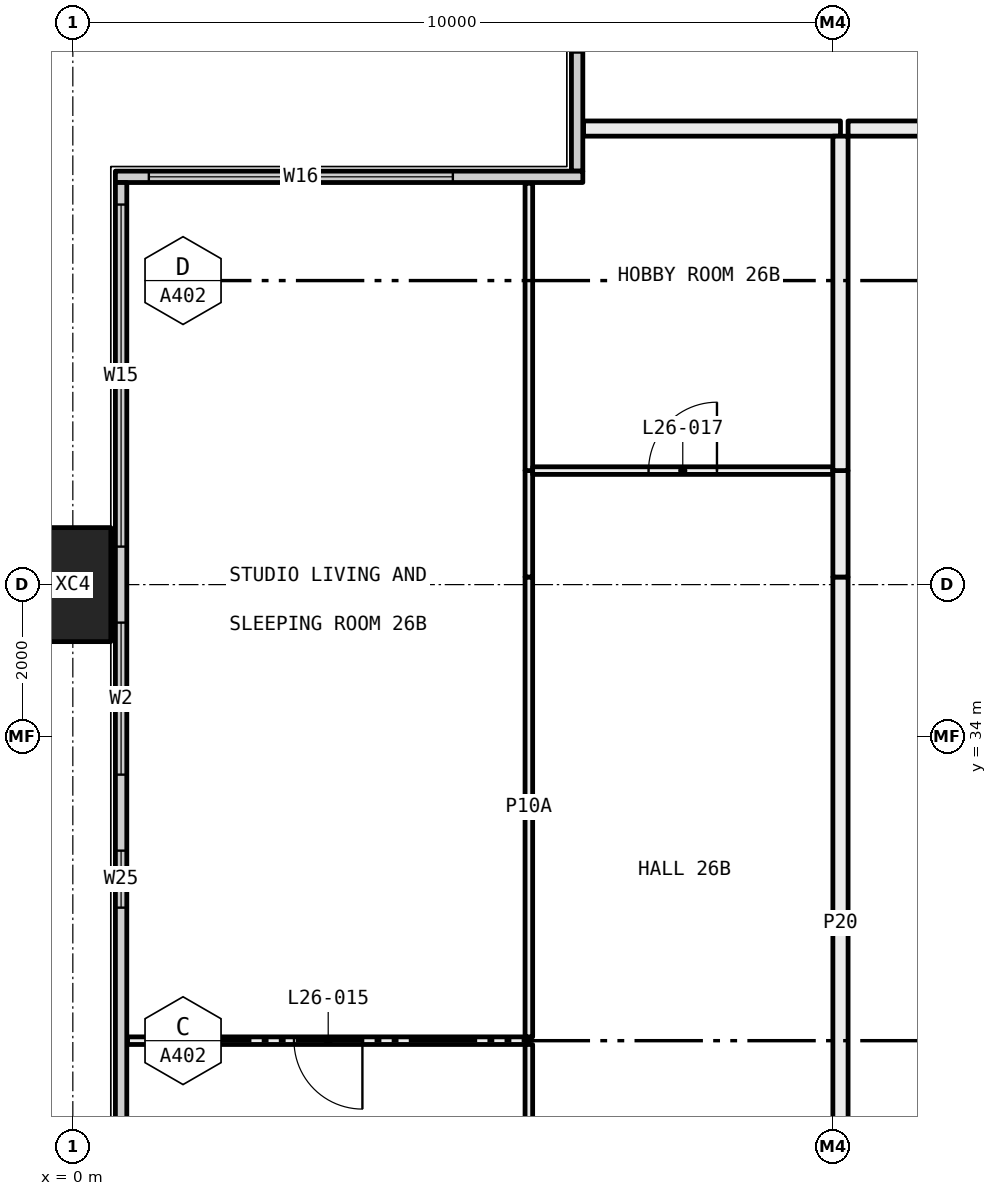
"""IFC4 building model, lengths in metres.
Left out: names, types, materials, properties, quantities, classifications, styles, units other than length and angle.
Written with IfcOpenShell. Run it as: python <this file> out.ifc"""

import sys

from ifc_helpers import new_model, si_unit, direction, frame, frame_2d, origin, origin_2d, place, context, subcontext, project, spatial, rectangle, hollow_rectangle, extrude, element, fill, save


model = new_model("IFC4")
c1 = context("Model", 3, precision=1e-05, world=origin(), true_north=direction((0.0, 1.0)))
c2 = subcontext(c1, "Body", "Model", "MODEL_VIEW")
j1 = project(units=[si_unit("LENGTHUNIT", "METRE"), si_unit("PLANEANGLEUNIT", "RADIAN")], contexts=[c1])
p1 = place(None, origin())
s1 = spatial("IfcSite", under=j1, at=p1, CompositionType="ELEMENT")
p2 = place(p1, origin())
s2 = spatial("IfcBuilding", under=s1, at=p2, CompositionType="ELEMENT")
p3 = place(p2, frame((0.0, 0.0, 103.5)))
s3 = spatial("IfcBuildingStorey", under=s2, at=p3, CompositionType="ELEMENT", Elevation=103.5)
p4 = place(p3, frame((0.0, 36.0, -0.4), z_axis=(0.0, 0.0, 1.0), x_axis=(0.0, 1.0, 0.0)))
e1 = element("IfcColumn", 1, at=p4, inside=s3, PredefinedType="COLUMN", context=c2, shape_type="SweptSolid", body=[
    extrude(hollow_rectangle(XDim=1.5, YDim=1.0, WallThickness=0.06, at=origin_2d()), origin(), (0.0, 0.0, 1.0), 3.45),
])
p5 = place(p3, frame((6.635, 41.44, 0.0), z_axis=(0.0, 0.0, 1.0), x_axis=(0.0, 1.0, 0.0)))
e2 = element("IfcWall", 2, at=p5, inside=s3, PredefinedType="ELEMENTEDWALL", context=c2, shape_type="SweptSolid", body=[
    extrude(rectangle(XDim=5.85, YDim=0.15, at=frame_2d((2.925, 0.0))), origin(), (0.0, 0.0, 1.0), 3.05),
])
p6 = place(p5, frame((1.56, 0.0, 0.45)))
e3 = element("IfcOpeningElement", 3, at=p6, cuts=e2, PredefinedType="OPENING", context=c2, shape_type="SweptSolid", body=[
    extrude(rectangle(XDim=4.0, YDim=2.55, at=frame_2d((2.0, 1.275))), frame((0.0, 0.085, 0.0), z_axis=(0.0, -1.0, 0.0), x_axis=(1.0, 0.0, 0.0)), (0.0, 0.0, 1.0), 0.17),
])
p7 = place(p3, frame((0.56, 41.365, 0.0), z_axis=(0.0, 0.0, 1.0), x_axis=(1.0, 0.0, 0.0)))
e4 = element("IfcWall", 4, at=p7, inside=s3, PredefinedType="ELEMENTEDWALL", context=c2, shape_type="SweptSolid", body=[
    extrude(rectangle(XDim=6.15, YDim=0.15, at=frame_2d((3.075, 0.0))), origin(), (0.0, 0.0, 1.0), 3.05),
])
p8 = place(p7, frame((0.44, 0.0, 0.45)))
e5 = element("IfcOpeningElement", 5, at=p8, cuts=e4, PredefinedType="OPENING", context=c2, shape_type="SweptSolid", body=[
    extrude(rectangle(XDim=4.0, YDim=2.55, at=frame_2d((2.0, 1.275))), frame((0.0, 0.085, 0.0), z_axis=(0.0, -1.0, 0.0), x_axis=(1.0, 0.0, 0.0)), (0.0, 0.0, 1.0), 0.17),
])
p9 = place(p3, frame((0.635, 18.71, 0.0), z_axis=(0.0, 0.0, 1.0), x_axis=(0.0, 1.0, 0.0)))
e6 = element("IfcWall", 6, at=p9, inside=s3, PredefinedType="ELEMENTEDWALL", context=c2, shape_type="SweptSolid", body=[
    extrude(rectangle(XDim=22.58, YDim=0.15, at=frame_2d((11.29, 0.0))), origin(), (0.0, 0.0, 1.0), 3.05),
])
p10 = place(p9, frame((0.29, 0.0, 0.45)))
e7 = element("IfcOpeningElement", 7, at=p10, cuts=e6, PredefinedType="OPENING", context=c2, shape_type="SweptSolid", body=[
    extrude(rectangle(XDim=4.5, YDim=2.55, at=frame_2d((2.25, 1.275))), frame((0.0, 0.085, 0.0), z_axis=(0.0, -1.0, 0.0), x_axis=(1.0, 0.0, 0.0)), (0.0, 0.0, 1.0), 0.17),
])
p11 = place(p9, frame((5.79, 0.0, 0.45)))
e8 = element("IfcOpeningElement", 8, at=p11, cuts=e6, PredefinedType="OPENING", context=c2, shape_type="SweptSolid", body=[
    extrude(rectangle(XDim=3.75, YDim=2.55, at=frame_2d((1.875, 1.275))), frame((0.0, 0.085, 0.0), z_axis=(0.0, -1.0, 0.0), x_axis=(1.0, 0.0, 0.0)), (0.0, 0.0, 1.0), 0.17),
])
p12 = place(p9, frame((13.04, 0.0, 0.45)))
e9 = element("IfcOpeningElement", 9, at=p12, cuts=e6, PredefinedType="OPENING", context=c2, shape_type="SweptSolid", body=[
    extrude(rectangle(XDim=0.75, YDim=2.55, at=frame_2d((0.375, 1.275))), frame((0.0, 0.085, 0.0), z_axis=(0.0, -1.0, 0.0), x_axis=(1.0, 0.0, 0.0)), (0.0, 0.0, 1.0), 0.17),
])
p13 = place(p9, frame((14.79, 0.0, 0.45)))
e10 = element("IfcOpeningElement", 10, at=p13, cuts=e6, PredefinedType="OPENING", context=c2, shape_type="SweptSolid", body=[
    extrude(rectangle(XDim=2.0, YDim=2.55, at=frame_2d((1.0, 1.275))), frame((0.0, 0.085, 0.0), z_axis=(0.0, -1.0, 0.0), x_axis=(1.0, 0.0, 0.0)), (0.0, 0.0, 1.0), 0.17),
])
p14 = place(p9, frame((17.79, 0.0, 0.45)))
e11 = element("IfcOpeningElement", 11, at=p14, cuts=e6, PredefinedType="OPENING", context=c2, shape_type="SweptSolid", body=[
    extrude(rectangle(XDim=4.5, YDim=2.55, at=frame_2d((2.25, 1.275))), frame((0.0, 0.085, 0.0), z_axis=(0.0, -1.0, 0.0), x_axis=(1.0, 0.0, 0.0)), (0.0, 0.0, 1.0), 0.17),
])
p15 = place(p3, frame((6.0, 30.0, 0.0), z_axis=(0.0, 0.0, 1.0), x_axis=(-1.0, 0.0, 0.0)))
e12 = element("IfcWall", 12, at=p15, inside=s3, PredefinedType="PARTITIONING", context=c2, shape_type="SweptSolid", body=[
    extrude(rectangle(XDim=5.28, YDim=0.1, at=frame_2d((2.64, 0.0))), origin(), (0.0, 0.0, 1.0), 3.05),
])
p16 = place(p15, frame((2.19, 0.0, 0.0)))
e13 = element("IfcOpeningElement", 13, at=p16, cuts=e12, PredefinedType="OPENING", context=c2, shape_type="SweptSolid", body=[
    extrude(rectangle(XDim=0.9, YDim=2.1, at=frame_2d((0.45, 1.05))), frame((0.0, 0.06, 0.0), z_axis=(0.0, -1.0, 0.0), x_axis=(1.0, 0.0, 0.0)), (0.0, 0.0, 1.0), 0.12),
])
p17 = place(p3, frame((6.0, 27.0, 0.0), z_axis=(0.0, 0.0, 1.0), x_axis=(0.0, 1.0, 0.0)))
e14 = element("IfcWall", 14, at=p17, inside=s3, PredefinedType="PARTITIONING", context=c2, shape_type="SweptSolid", body=[
    extrude(rectangle(XDim=2.95, YDim=0.1, at=frame_2d((1.475, 0.0))), origin(), (0.0, 0.0, 1.0), 3.05),
])
p18 = place(p3, frame((6.0, 30.05, 0.0), z_axis=(0.0, 0.0, 1.0), x_axis=(0.0, 1.0, 0.0)))
e15 = element("IfcWall", 15, at=p18, inside=s3, PredefinedType="PARTITIONING", context=c2, shape_type="SweptSolid", body=[
    extrude(rectangle(XDim=6.05, YDim=0.1, at=frame_2d((3.025, 0.0))), origin(), (0.0, 0.0, 1.0), 2.45),
])
p19 = place(p3, frame((6.0, 36.1, 0.0), z_axis=(0.0, 0.0, 1.0), x_axis=(0.0, 1.0, 0.0)))
e16 = element("IfcWall", 16, at=p19, inside=s3, PredefinedType="PARTITIONING", context=c2, shape_type="SweptSolid", body=[
    extrude(rectangle(XDim=1.4, YDim=0.1, at=frame_2d((0.7, 0.0))), origin(), (0.0, 0.0, 1.0), 3.05),
])
p20 = place(p3, frame((6.0, 37.5, 0.0), z_axis=(0.0, 0.0, 1.0), x_axis=(0.0, 1.0, 0.0)))
e17 = element("IfcWall", 17, at=p20, inside=s3, PredefinedType="PARTITIONING", context=c2, shape_type="SweptSolid", body=[
    extrude(rectangle(XDim=3.78, YDim=0.1, at=frame_2d((1.89, 0.0))), origin(), (0.0, 0.0, 1.0), 3.05),
])
p21 = place(p3, frame((10.0, 37.5, 0.0), z_axis=(0.0, 0.0, 1.0), x_axis=(-1.0, 0.0, 0.0)))
e18 = element("IfcWall", 18, at=p21, inside=s3, PredefinedType="PARTITIONING", context=c2, shape_type="SweptSolid", body=[
    extrude(rectangle(XDim=3.95, YDim=0.1, at=frame_2d((1.975, 0.0))), origin(), (0.0, 0.0, 1.0), 3.05),
])
p22 = place(p21, frame((1.525, 0.0, 0.0)))
e19 = element("IfcOpeningElement", 19, at=p22, cuts=e18, PredefinedType="OPENING", context=c2, shape_type="SweptSolid", body=[
    extrude(rectangle(XDim=0.9, YDim=2.1, at=frame_2d((0.45, 1.05))), frame((0.0, 0.06, 0.0), z_axis=(0.0, -1.0, 0.0), x_axis=(1.0, 0.0, 0.0)), (0.0, 0.0, 1.0), 0.12),
])
p23 = place(p3, frame((10.1, 27.0, 0.0), z_axis=(0.0, 0.0, 1.0), x_axis=(0.0, 1.0, 0.0)))
e20 = element("IfcWall", 20, at=p23, inside=s3, PredefinedType="PARTITIONING", context=c2, shape_type="SweptSolid", body=[
    extrude(rectangle(XDim=9.1, YDim=0.2, at=frame_2d((4.55, 0.0))), origin(), (0.0, 0.0, 1.0), 2.45),
])
p24 = place(p3, frame((10.1, 36.1, 0.0), z_axis=(0.0, 0.0, 1.0), x_axis=(0.0, 1.0, 0.0)))
e21 = element("IfcWall", 21, at=p24, inside=s3, PredefinedType="PARTITIONING", context=c2, shape_type="SweptSolid", body=[
    extrude(rectangle(XDim=1.4, YDim=0.2, at=frame_2d((0.7, 0.0))), origin(), (0.0, 0.0, 1.0), 3.05),
])
p25 = place(p3, frame((10.1, 42.0, 0.0), z_axis=(0.0, 0.0, 1.0), x_axis=(-1.0, 0.0, 0.0)))
e22 = element("IfcWall", 22, at=p25, inside=s3, PredefinedType="PARTITIONING", context=c2, shape_type="SweptSolid", body=[
    extrude(rectangle(XDim=3.38, YDim=0.2, at=frame_2d((1.69, 0.0))), origin(), (0.0, 0.0, 1.0), 3.05),
])
p26 = place(p3, frame((10.1, 37.5, 0.0), z_axis=(0.0, 0.0, 1.0), x_axis=(0.0, 1.0, 0.0)))
e23 = element("IfcWall", 23, at=p26, inside=s3, PredefinedType="PARTITIONING", context=c2, shape_type="SweptSolid", body=[
    extrude(rectangle(XDim=4.4, YDim=0.2, at=frame_2d((2.2, 0.0))), origin(), (0.0, 0.0, 1.0), 3.05),
])
p27 = place(p3, frame((10.2, 42.0, 0.0), z_axis=(0.0, 0.0, 1.0), x_axis=(1.0, 0.0, 0.0)))
e24 = element("IfcWall", 24, at=p27, inside=s3, PredefinedType="PARTITIONING", context=c2, shape_type="SweptSolid", body=[
    extrude(rectangle(XDim=1.8, YDim=0.2, at=frame_2d((0.9, 0.0))), origin(), (0.0, 0.0, 1.0), 3.05),
])
p28 = place(p8, origin())
e25 = element("IfcWindow", 25, at=p28, inside=s3, PartitioningType="SINGLE_PANEL", PredefinedType="WINDOW", context=c2, shape_type="SweptSolid", body=[
    extrude(rectangle(XDim=4.0, YDim=2.55, at=frame_2d((2.0, 1.275))), frame((0.0, 0.03, 0.0), z_axis=(0.0, -1.0, 0.0), x_axis=(1.0, 0.0, 0.0)), (0.0, 0.0, 1.0), 0.06),
])
fill(e5, e25)
p29 = place(p12, origin())
e26 = element("IfcWindow", 26, at=p29, inside=s3, PartitioningType="SINGLE_PANEL", PredefinedType="WINDOW", context=c2, shape_type="SweptSolid", body=[
    extrude(rectangle(XDim=0.75, YDim=2.55, at=frame_2d((0.375, 1.275))), frame((0.0, 0.03, 0.0), z_axis=(0.0, -1.0, 0.0), x_axis=(1.0, 0.0, 0.0)), (0.0, 0.0, 1.0), 0.06),
])
fill(e9, e26)
p30 = place(p13, origin())
e27 = element("IfcWindow", 27, at=p30, inside=s3, PartitioningType="SINGLE_PANEL", PredefinedType="WINDOW", context=c2, shape_type="SweptSolid", body=[
    extrude(rectangle(XDim=2.0, YDim=2.55, at=frame_2d((1.0, 1.275))), frame((0.0, 0.03, 0.0), z_axis=(0.0, -1.0, 0.0), x_axis=(1.0, 0.0, 0.0)), (0.0, 0.0, 1.0), 0.06),
])
fill(e10, e27)
p31 = place(p14, origin())
e28 = element("IfcWindow", 28, at=p31, inside=s3, PartitioningType="SINGLE_PANEL", PredefinedType="WINDOW", context=c2, shape_type="SweptSolid", body=[
    extrude(rectangle(XDim=4.5, YDim=2.55, at=frame_2d((2.25, 1.275))), frame((0.0, 0.03, 0.0), z_axis=(0.0, -1.0, 0.0), x_axis=(1.0, 0.0, 0.0)), (0.0, 0.0, 1.0), 0.06),
])
fill(e11, e28)
p32 = place(p16, origin())
e29 = element("IfcDoor", 29, at=p32, inside=s3, OperationType="SINGLE_SWING_RIGHT", PredefinedType="DOOR", context=c2, shape_type="SweptSolid", body=[
    extrude(rectangle(XDim=0.9, YDim=2.1, at=frame_2d((0.45, 1.05))), frame((0.0, 0.025, 0.0), z_axis=(0.0, -1.0, 0.0), x_axis=(1.0, 0.0, 0.0)), (0.0, 0.0, 1.0), 0.05),
])
fill(e13, e29)
p33 = place(p22, frame((0.9, 0.0, 0.0), x_axis=(-1.0, 0.0, 0.0)))
e30 = element("IfcDoor", 30, at=p33, inside=s3, OperationType="SINGLE_SWING_LEFT", PredefinedType="DOOR", context=c2, shape_type="SweptSolid", body=[
    extrude(rectangle(XDim=0.9, YDim=2.1, at=frame_2d((0.45, 1.05))), frame((0.0, 0.025, 0.0), z_axis=(0.0, -1.0, 0.0), x_axis=(1.0, 0.0, 0.0)), (0.0, 0.0, 1.0), 0.05),
])
fill(e19, e30)
save(model, sys.argv[1])
